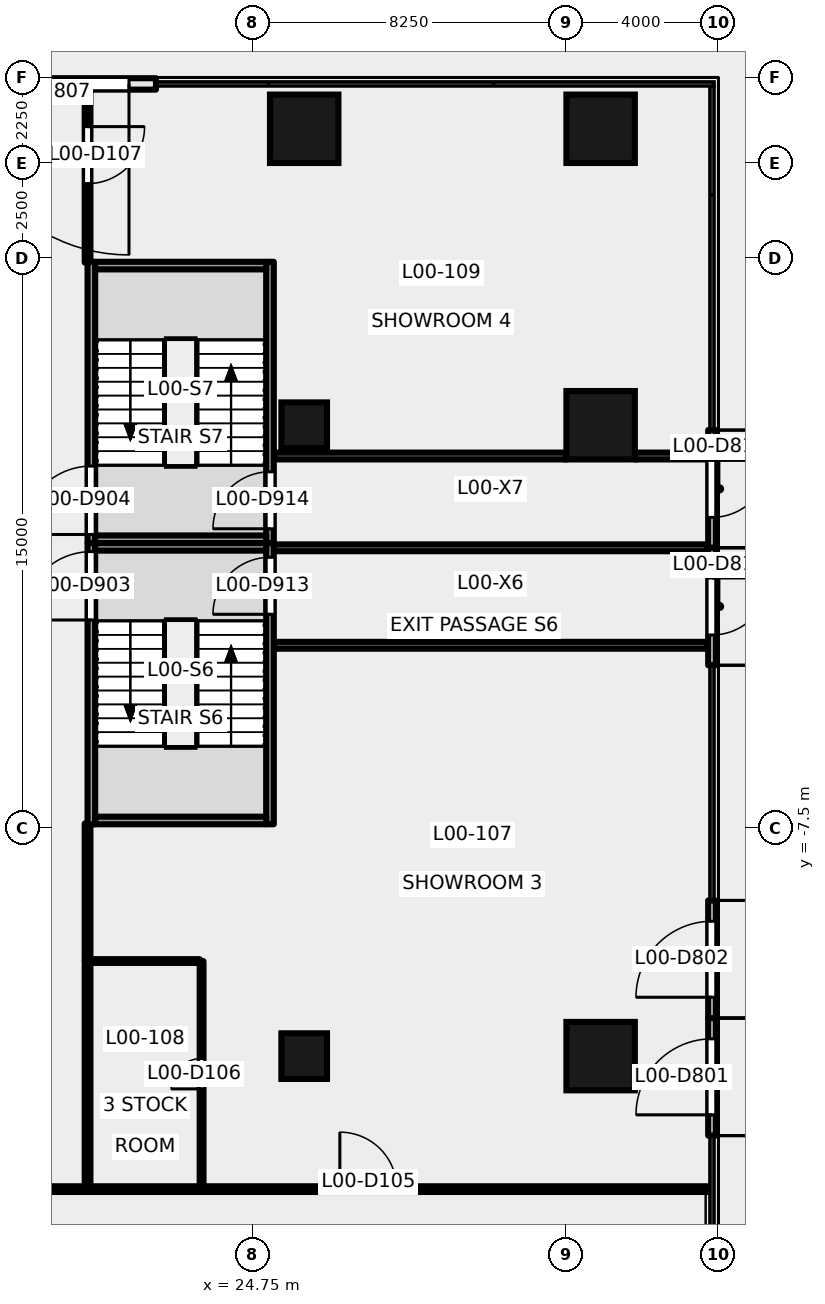
"""IFC4 building model, lengths in metres.
Left out: names, types, materials, properties, quantities, classifications, styles, units other than length and angle.
Written with IfcOpenShell. Run it as: python <this file> out.ifc"""

import sys

from ifc_helpers import new_model, si_unit, direction, frame, frame_2d, origin, origin_2d, place, context, subcontext, project, spatial, rectangle, extrude, element, fill, save


model = new_model("IFC4")
c1 = context("Model", 3, precision=1e-05, world=origin(), true_north=direction((0.0, 1.0)))
c2 = subcontext(c1, "Body", "Model", "MODEL_VIEW")
j1 = project(units=[si_unit("LENGTHUNIT", "METRE"), si_unit("PLANEANGLEUNIT", "RADIAN")], contexts=[c1])
p1 = place(None, origin())
s1 = spatial("IfcSite", under=j1, at=p1, CompositionType="ELEMENT")
p2 = place(p1, origin())
s2 = spatial("IfcBuilding", under=s1, at=p2, CompositionType="ELEMENT")
p3 = place(p2, origin())
s3 = spatial("IfcBuildingStorey", under=s2, at=p3, CompositionType="ELEMENT", Elevation=0.0)
for number, where, z_axis, x_axis in (
    (1, (33.9, 10.9, -0.2), (0.0, 0.0, 1.0), (1.0, 0.0, 0.0)),
    (2, (33.9, -13.5, -0.2), (0.0, 0.0, 1.0), (0.0, 1.0, 0.0)),
    (3, (33.9, 3.1, -0.2), (0.0, 0.0, 1.0), (0.0, 1.0, 0.0)),
    (4, (26.1, 10.9, -0.2), (0.0, 0.0, 1.0), (1.0, 0.0, 0.0)),
):
    element("IfcColumn", number, at=place(p3, frame(where, z_axis=z_axis, x_axis=x_axis)), inside=s3, PredefinedType="COLUMN", context=c2, shape_type="SweptSolid", body=[
        extrude(rectangle(XDim=1.8, YDim=1.8, at=origin_2d()), origin(), (0.0, 0.0, 1.0), 7.2),
    ])
for number, where, z_axis, x_axis in (
    (5, (26.1, -13.5, -0.2), (0.0, 0.0, 1.0), (1.0, 0.0, 0.0)),
    (6, (26.1, 3.1, -0.2), (0.0, 0.0, 1.0), (1.0, 0.0, 0.0)),
):
    element("IfcColumn", number, at=place(p3, frame(where, z_axis=z_axis, x_axis=x_axis)), inside=s3, PredefinedType="COLUMN", context=c2, shape_type="SweptSolid", body=[
        extrude(rectangle(XDim=1.2, YDim=1.2, at=origin_2d()), origin(), (0.0, 0.0, 1.0), 7.2),
    ])
p4 = place(p3, frame((36.83, -15.592, 0.0), z_axis=(0.0, 0.0, 1.0), x_axis=(0.0, 1.0, 0.0)))
e7 = element("IfcWall", 7, at=p4, inside=s3, PredefinedType="SOLIDWALL", context=c2, shape_type="SweptSolid", body=[
    extrude(rectangle(XDim=3.094, YDim=0.2, at=frame_2d((1.547, 0.0))), origin(), (0.0, 0.0, 1.0), 7.0),
])
p5 = place(p4, frame((0.547, 0.0, 0.0)))
e8 = element("IfcOpeningElement", 8, at=p5, cuts=e7, PredefinedType="OPENING", context=c2, shape_type="SweptSolid", body=[
    extrude(rectangle(XDim=2.0, YDim=2.4, at=frame_2d((1.0, 1.2))), frame((0.0, 0.111, 0.0), z_axis=(0.0, -1.0, 0.0), x_axis=(1.0, 0.0, 0.0)), (0.0, 0.0, 1.0), 0.221),
])
p6 = place(p3, frame((36.83, -12.498, 0.0), z_axis=(0.0, 0.0, 1.0), x_axis=(0.0, 1.0, 0.0)))
e9 = element("IfcWall", 9, at=p6, inside=s3, PredefinedType="SOLIDWALL", context=c2, shape_type="SweptSolid", body=[
    extrude(rectangle(XDim=3.094, YDim=0.2, at=frame_2d((1.547, 0.0))), origin(), (0.0, 0.0, 1.0), 7.0),
])
p7 = place(p6, frame((0.547, 0.0, 0.0)))
e10 = element("IfcOpeningElement", 10, at=p7, cuts=e9, PredefinedType="OPENING", context=c2, shape_type="SweptSolid", body=[
    extrude(rectangle(XDim=2.0, YDim=2.4, at=frame_2d((1.0, 1.2))), frame((0.0, 0.111, 0.0), z_axis=(0.0, -1.0, 0.0), x_axis=(1.0, 0.0, 0.0)), (0.0, 0.0, 1.0), 0.221),
])
p8 = place(p3, frame((36.83, -0.122, 0.0), z_axis=(0.0, 0.0, 1.0), x_axis=(0.0, -1.0, 0.0)))
e11 = element("IfcWall", 11, at=p8, inside=s3, PredefinedType="SOLIDWALL", context=c2, shape_type="SweptSolid", body=[
    extrude(rectangle(XDim=3.094, YDim=0.2, at=frame_2d((1.547, 0.0))), origin(), (0.0, 0.0, 1.0), 7.0),
])
p9 = place(p8, frame((0.797, 0.0, 0.0)))
e12 = element("IfcOpeningElement", 12, at=p9, cuts=e11, PredefinedType="OPENING", context=c2, shape_type="SweptSolid", body=[
    extrude(rectangle(XDim=1.5, YDim=2.4, at=frame_2d((0.75, 1.2))), frame((0.0, 0.111, 0.0), z_axis=(0.0, -1.0, 0.0), x_axis=(1.0, 0.0, 0.0)), (0.0, 0.0, 1.0), 0.221),
])
p10 = place(p3, frame((36.83, 2.972, 0.0), z_axis=(0.0, 0.0, 1.0), x_axis=(0.0, -1.0, 0.0)))
e13 = element("IfcWall", 13, at=p10, inside=s3, PredefinedType="SOLIDWALL", context=c2, shape_type="SweptSolid", body=[
    extrude(rectangle(XDim=3.094, YDim=0.2, at=frame_2d((1.547, 0.0))), origin(), (0.0, 0.0, 1.0), 7.0),
])
p11 = place(p10, frame((0.797, 0.0, 0.0)))
e14 = element("IfcOpeningElement", 14, at=p11, cuts=e13, PredefinedType="OPENING", context=c2, shape_type="SweptSolid", body=[
    extrude(rectangle(XDim=1.5, YDim=2.4, at=frame_2d((0.75, 1.2))), frame((0.0, 0.111, 0.0), z_axis=(0.0, -1.0, 0.0), x_axis=(1.0, 0.0, 0.0)), (0.0, 0.0, 1.0), 0.221),
])
p12 = place(p3, frame((22.2, 12.08, 0.0), z_axis=(0.0, 0.0, 1.0), x_axis=(-1.0, 0.0, 0.0)))
e15 = element("IfcWall", 15, at=p12, inside=s3, PredefinedType="SOLIDWALL", context=c2, shape_type="SweptSolid", body=[
    extrude(rectangle(XDim=5.92, YDim=0.3, at=frame_2d((2.96, 0.0))), origin(), (0.0, 0.0, 1.0), 7.0),
])
p13 = place(p12, frame((0.71, 0.0, 0.0)))
e16 = element("IfcOpeningElement", 16, at=p13, cuts=e15, PredefinedType="OPENING", context=c2, shape_type="SweptSolid", body=[
    extrude(rectangle(XDim=4.5, YDim=4.2, at=frame_2d((2.25, 2.1))), frame((0.0, 0.161, 0.0), z_axis=(0.0, -1.0, 0.0), x_axis=(1.0, 0.0, 0.0)), (0.0, 0.0, 1.0), 0.321),
])
p14 = place(p3, frame((20.5, -7.4, -0.2), z_axis=(0.0, 0.0, 1.0), x_axis=(0.0, 1.0, 0.0)))
e17 = element("IfcWall", 17, at=p14, inside=s3, PredefinedType="SHEAR", context=c2, shape_type="SweptSolid", body=[
    extrude(rectangle(XDim=7.4, YDim=0.2, at=frame_2d((3.7, 0.0))), origin(), (0.0, 0.0, 1.0), 7.2),
])
p15 = place(p14, frame((5.375, 0.0, 0.2)))
e18 = element("IfcOpeningElement", 18, at=p15, cuts=e17, PredefinedType="OPENING", context=c2, shape_type="SweptSolid", body=[
    extrude(rectangle(XDim=1.8, YDim=2.1, at=frame_2d((0.9, 1.05))), frame((0.0, 0.111, 0.0), z_axis=(0.0, -1.0, 0.0), x_axis=(1.0, 0.0, 0.0)), (0.0, 0.0, 1.0), 0.221),
])
p16 = place(p3, frame((25.2, -7.4, -0.2), z_axis=(0.0, 0.0, 1.0), x_axis=(0.0, 1.0, 0.0)))
e19 = element("IfcWall", 19, at=p16, inside=s3, PredefinedType="SHEAR", context=c2, shape_type="SweptSolid", body=[
    extrude(rectangle(XDim=7.4, YDim=0.2, at=frame_2d((3.7, 0.0))), origin(), (0.0, 0.0, 1.0), 7.2),
])
p17 = place(p16, frame((5.525, 0.0, 0.2)))
e20 = element("IfcOpeningElement", 20, at=p17, cuts=e19, PredefinedType="OPENING", context=c2, shape_type="SweptSolid", body=[
    extrude(rectangle(XDim=1.5, YDim=2.1, at=frame_2d((0.75, 1.05))), frame((0.0, 0.111, 0.0), z_axis=(0.0, -1.0, 0.0), x_axis=(1.0, 0.0, 0.0)), (0.0, 0.0, 1.0), 0.221),
])
for number, where, z_axis, x_axis in (
    (21, (20.6, -0.1, -0.2), (0.0, 0.0, 1.0), (1.0, 0.0, 0.0)),
    (22, (20.6, -7.3, -0.2), (0.0, 0.0, 1.0), (1.0, 0.0, 0.0)),
):
    element("IfcWall", number, at=place(p3, frame(where, z_axis=z_axis, x_axis=x_axis)), inside=s3, PredefinedType="SHEAR", context=c2, shape_type="SweptSolid", body=[
        extrude(rectangle(XDim=4.5, YDim=0.2, at=frame_2d((2.25, 0.0))), origin(), (0.0, 0.0, 1.0), 7.2),
    ])
p18 = place(p3, frame((20.5, 0.0, -0.2), z_axis=(0.0, 0.0, 1.0), x_axis=(0.0, 1.0, 0.0)))
e23 = element("IfcWall", 23, at=p18, inside=s3, PredefinedType="SHEAR", context=c2, shape_type="SweptSolid", body=[
    extrude(rectangle(XDim=7.4, YDim=0.2, at=frame_2d((3.7, 0.0))), origin(), (0.0, 0.0, 1.0), 7.2),
])
p19 = place(p18, frame((0.225, 0.0, 0.2)))
e24 = element("IfcOpeningElement", 24, at=p19, cuts=e23, PredefinedType="OPENING", context=c2, shape_type="SweptSolid", body=[
    extrude(rectangle(XDim=1.8, YDim=2.1, at=frame_2d((0.9, 1.05))), frame((0.0, 0.111, 0.0), z_axis=(0.0, -1.0, 0.0), x_axis=(1.0, 0.0, 0.0)), (0.0, 0.0, 1.0), 0.221),
])
p20 = place(p3, frame((25.2, 0.0, -0.2), z_axis=(0.0, 0.0, 1.0), x_axis=(0.0, 1.0, 0.0)))
e25 = element("IfcWall", 25, at=p20, inside=s3, PredefinedType="SHEAR", context=c2, shape_type="SweptSolid", body=[
    extrude(rectangle(XDim=7.4, YDim=0.2, at=frame_2d((3.7, 0.0))), origin(), (0.0, 0.0, 1.0), 7.2),
])
p21 = place(p20, frame((0.375, 0.0, 0.2)))
e26 = element("IfcOpeningElement", 26, at=p21, cuts=e25, PredefinedType="OPENING", context=c2, shape_type="SweptSolid", body=[
    extrude(rectangle(XDim=1.5, YDim=2.1, at=frame_2d((0.75, 1.05))), frame((0.0, 0.111, 0.0), z_axis=(0.0, -1.0, 0.0), x_axis=(1.0, 0.0, 0.0)), (0.0, 0.0, 1.0), 0.221),
])
for number, where, z_axis, x_axis in (
    (27, (20.6, 7.3, -0.2), (0.0, 0.0, 1.0), (1.0, 0.0, 0.0)),
    (28, (20.6, 0.1, -0.2), (0.0, 0.0, 1.0), (1.0, 0.0, 0.0)),
):
    element("IfcWall", number, at=place(p3, frame(where, z_axis=z_axis, x_axis=x_axis)), inside=s3, PredefinedType="SHEAR", context=c2, shape_type="SweptSolid", body=[
        extrude(rectangle(XDim=4.5, YDim=0.2, at=frame_2d((2.25, 0.0))), origin(), (0.0, 0.0, 1.0), 7.2),
    ])
for number, where, z_axis, x_axis in (
    (29, (25.3, -2.69, 0.0), (0.0, 0.0, 1.0), (1.0, 0.0, 0.0)),
    (30, (25.3, -0.125, 0.0), (0.0, 0.0, 1.0), (1.0, 0.0, 0.0)),
):
    element("IfcWall", number, at=place(p3, frame(where, z_axis=z_axis, x_axis=x_axis)), inside=s3, PredefinedType="PARTITIONING", context=c2, shape_type="SweptSolid", body=[
        extrude(rectangle(XDim=11.4, YDim=0.18, at=frame_2d((5.7, 0.0))), origin(), (0.0, 0.0, 1.0), 7.0),
    ])
p22 = place(p3, frame((25.3, 2.29, 0.0), z_axis=(0.0, 0.0, 1.0), x_axis=(1.0, 0.0, 0.0)))
e31 = element("IfcWall", 31, at=p22, inside=s3, PredefinedType="PARTITIONING", context=c2, shape_type="SweptSolid", body=[
    extrude(rectangle(XDim=7.7, YDim=0.18, at=frame_2d((3.85, 0.0))), origin(), (0.0, 0.0, 1.0), 7.0),
])
p23 = place(p3, frame((34.8, 2.29, 0.0), z_axis=(0.0, 0.0, 1.0), x_axis=(1.0, 0.0, 0.0)))
e32 = element("IfcWall", 32, at=p23, inside=s3, PredefinedType="PARTITIONING", context=c2, shape_type="SweptSolid", body=[
    extrude(rectangle(XDim=1.9, YDim=0.18, at=frame_2d((0.95, 0.0))), origin(), (0.0, 0.0, 1.0), 7.0),
])
p24 = place(p3, frame((-15.4, -17.0, 0.0), z_axis=(0.0, 0.0, 1.0), x_axis=(1.0, 0.0, 0.0)))
e33 = element("IfcWall", 33, at=p24, inside=s3, PredefinedType="PARTITIONING", context=c2, shape_type="SweptSolid", body=[
    extrude(rectangle(XDim=35.8, YDim=0.15, at=frame_2d((17.9, 0.0))), origin(), (0.0, 0.0, 1.0), 6.0),
])
p25 = place(p24, frame((17.0, 0.0, 0.0)))
e34 = element("IfcOpeningElement", 34, at=p25, cuts=e33, PredefinedType="OPENING", context=c2, shape_type="SweptSolid", body=[
    extrude(rectangle(XDim=1.8, YDim=2.1, at=frame_2d((0.9, 1.05))), frame((0.0, 0.085, 0.0), z_axis=(0.0, -1.0, 0.0), x_axis=(1.0, 0.0, 0.0)), (0.0, 0.0, 1.0), 0.171),
])
p26 = place(p24, frame((27.05, 0.0, 0.0)))
e35 = element("IfcOpeningElement", 35, at=p26, cuts=e33, PredefinedType="OPENING", context=c2, shape_type="SweptSolid", body=[
    extrude(rectangle(XDim=1.8, YDim=2.1, at=frame_2d((0.9, 1.05))), frame((0.0, 0.085, 0.0), z_axis=(0.0, -1.0, 0.0), x_axis=(1.0, 0.0, 0.0)), (0.0, 0.0, 1.0), 0.171),
])
p27 = place(p3, frame((20.4, -7.38, 0.0), z_axis=(0.0, 0.0, 1.0), x_axis=(0.0, -1.0, 0.0)))
e36 = element("IfcWall", 36, at=p27, inside=s3, PredefinedType="PARTITIONING", context=c2, shape_type="SweptSolid", body=[
    extrude(rectangle(XDim=3.599, YDim=0.15, at=frame_2d((1.8, 0.0))), origin(), (0.0, 0.0, 1.0), 7.0),
])
p28 = place(p3, frame((20.4, -10.979, 0.0), z_axis=(0.0, 0.0, 1.0), x_axis=(0.0, -1.0, 0.0)))
e37 = element("IfcWall", 37, at=p28, inside=s3, PredefinedType="PARTITIONING", context=c2, shape_type="SweptSolid", body=[
    extrude(rectangle(XDim=5.946, YDim=0.15, at=frame_2d((2.973, 0.0))), origin(), (0.0, 0.0, 1.0), 6.0),
])
p29 = place(p3, frame((20.4, 11.99, 0.0), z_axis=(0.0, 0.0, 1.0), x_axis=(0.0, -1.0, 0.0)))
e38 = element("IfcWall", 38, at=p29, inside=s3, PredefinedType="PARTITIONING", context=c2, shape_type="SweptSolid", body=[
    extrude(rectangle(XDim=4.61, YDim=0.15, at=frame_2d((2.305, 0.0))), origin(), (0.0, 0.0, 1.0), 6.0),
])
p30 = place(p29, frame((1.033, 0.0, 0.0)))
e39 = element("IfcOpeningElement", 39, at=p30, cuts=e38, PredefinedType="OPENING", context=c2, shape_type="SweptSolid", body=[
    extrude(rectangle(XDim=1.5, YDim=2.1, at=frame_2d((0.75, 1.05))), frame((0.0, 0.085, 0.0), z_axis=(0.0, -1.0, 0.0), x_axis=(1.0, 0.0, 0.0)), (0.0, 0.0, 1.0), 0.171),
])
p31 = place(p3, frame((23.38, -17.0, 0.0), z_axis=(0.0, 0.0, 1.0), x_axis=(1.0, 0.0, 0.0)))
e40 = element("IfcWall", 40, at=p31, inside=s3, PredefinedType="PARTITIONING", context=c2, shape_type="SweptSolid", body=[
    extrude(rectangle(XDim=13.36, YDim=0.15, at=frame_2d((6.68, 0.0))), origin(), (0.0, 0.0, 1.0), 6.0),
])
p32 = place(p31, frame((3.658, 0.0, 0.0)))
e41 = element("IfcOpeningElement", 41, at=p32, cuts=e40, PredefinedType="OPENING", context=c2, shape_type="SweptSolid", body=[
    extrude(rectangle(XDim=1.5, YDim=2.1, at=frame_2d((0.75, 1.05))), frame((0.0, 0.085, 0.0), z_axis=(0.0, -1.0, 0.0), x_axis=(1.0, 0.0, 0.0)), (0.0, 0.0, 1.0), 0.171),
])
p33 = place(p3, frame((20.4, -17.0, 0.0), z_axis=(0.0, 0.0, 1.0), x_axis=(1.0, 0.0, 0.0)))
e42 = element("IfcWall", 42, at=p33, inside=s3, PredefinedType="PARTITIONING", context=c2, shape_type="SweptSolid", body=[
    extrude(rectangle(XDim=2.98, YDim=0.15, at=frame_2d((1.49, 0.0))), origin(), (0.0, 0.0, 1.0), 6.39),
])
p34 = place(p3, frame((23.35, -10.999, 0.0), z_axis=(0.0, 0.0, 1.0), x_axis=(-1.0, 0.0, 0.0)))
e43 = element("IfcWall", 43, at=p34, inside=s3, PredefinedType="PARTITIONING", context=c2, shape_type="SweptSolid", body=[
    extrude(rectangle(XDim=2.875, YDim=0.1, at=frame_2d((1.438, 0.0))), origin(), (0.0, 0.0, 1.0), 6.7),
])
p35 = place(p3, frame((23.4, -16.925, 0.0), z_axis=(0.0, 0.0, 1.0), x_axis=(0.0, 1.0, 0.0)))
e44 = element("IfcWall", 44, at=p35, inside=s3, PredefinedType="PARTITIONING", context=c2, shape_type="SweptSolid", body=[
    extrude(rectangle(XDim=5.926, YDim=0.1, at=frame_2d((2.963, 0.0))), origin(), (0.0, 0.0, 1.0), 6.0),
])
p36 = place(p35, frame((2.563, 0.0, 0.0)))
e45 = element("IfcOpeningElement", 45, at=p36, cuts=e44, PredefinedType="OPENING", context=c2, shape_type="SweptSolid", body=[
    extrude(rectangle(XDim=0.8, YDim=2.1, at=frame_2d((0.4, 1.05))), frame((0.0, 0.061, 0.0), z_axis=(0.0, -1.0, 0.0), x_axis=(1.0, 0.0, 0.0)), (0.0, 0.0, 1.0), 0.121),
])
p37 = place(p5, origin())
e46 = element("IfcDoor", 46, at=p37, inside=s3, OperationType="DOUBLE_DOOR_SINGLE_SWING", PredefinedType="DOOR", context=c2, shape_type="SweptSolid", body=[
    extrude(rectangle(XDim=2.0, YDim=2.4, at=frame_2d((1.0, 1.2))), frame((0.0, 0.025, 0.0), z_axis=(0.0, -1.0, 0.0), x_axis=(1.0, 0.0, 0.0)), (0.0, 0.0, 1.0), 0.05),
])
fill(e8, e46)
p38 = place(p7, origin())
e47 = element("IfcDoor", 47, at=p38, inside=s3, OperationType="DOUBLE_DOOR_SINGLE_SWING", PredefinedType="DOOR", context=c2, shape_type="SweptSolid", body=[
    extrude(rectangle(XDim=2.0, YDim=2.4, at=frame_2d((1.0, 1.2))), frame((0.0, 0.025, 0.0), z_axis=(0.0, -1.0, 0.0), x_axis=(1.0, 0.0, 0.0)), (0.0, 0.0, 1.0), 0.05),
])
fill(e10, e47)
p39 = place(p9, origin())
e48 = element("IfcDoor", 48, at=p39, inside=s3, OperationType="DOUBLE_DOOR_SINGLE_SWING", PredefinedType="DOOR", context=c2, shape_type="SweptSolid", body=[
    extrude(rectangle(XDim=1.5, YDim=2.4, at=frame_2d((0.75, 1.2))), frame((0.0, 0.025, 0.0), z_axis=(0.0, -1.0, 0.0), x_axis=(1.0, 0.0, 0.0)), (0.0, 0.0, 1.0), 0.05),
])
fill(e12, e48)
p40 = place(p11, origin())
e49 = element("IfcDoor", 49, at=p40, inside=s3, OperationType="DOUBLE_DOOR_SINGLE_SWING", PredefinedType="DOOR", context=c2, shape_type="SweptSolid", body=[
    extrude(rectangle(XDim=1.5, YDim=2.4, at=frame_2d((0.75, 1.2))), frame((0.0, 0.025, 0.0), z_axis=(0.0, -1.0, 0.0), x_axis=(1.0, 0.0, 0.0)), (0.0, 0.0, 1.0), 0.05),
])
fill(e14, e49)
p41 = place(p13, origin())
e50 = element("IfcDoor", 50, at=p41, inside=s3, OperationType="USERDEFINED", PredefinedType="DOOR", context=c2, shape_type="SweptSolid", body=[
    extrude(rectangle(XDim=4.5, YDim=4.2, at=frame_2d((2.25, 2.1))), frame((0.0, 0.025, 0.0), z_axis=(0.0, -1.0, 0.0), x_axis=(1.0, 0.0, 0.0)), (0.0, 0.0, 1.0), 0.05),
])
fill(e16, e50)
p42 = place(p15, origin())
e51 = element("IfcDoor", 51, at=p42, inside=s3, OperationType="DOUBLE_DOOR_SINGLE_SWING", PredefinedType="DOOR", context=c2, shape_type="SweptSolid", body=[
    extrude(rectangle(XDim=1.8, YDim=2.1, at=frame_2d((0.9, 1.05))), frame((0.0, 0.025, 0.0), z_axis=(0.0, -1.0, 0.0), x_axis=(1.0, 0.0, 0.0)), (0.0, 0.0, 1.0), 0.05),
])
fill(e18, e51)
p43 = place(p17, origin())
e52 = element("IfcDoor", 52, at=p43, inside=s3, OperationType="DOUBLE_DOOR_SINGLE_SWING", PredefinedType="DOOR", context=c2, shape_type="SweptSolid", body=[
    extrude(rectangle(XDim=1.5, YDim=2.1, at=frame_2d((0.75, 1.05))), frame((0.0, 0.025, 0.0), z_axis=(0.0, -1.0, 0.0), x_axis=(1.0, 0.0, 0.0)), (0.0, 0.0, 1.0), 0.05),
])
fill(e20, e52)
p44 = place(p19, origin())
e53 = element("IfcDoor", 53, at=p44, inside=s3, OperationType="DOUBLE_DOOR_SINGLE_SWING", PredefinedType="DOOR", context=c2, shape_type="SweptSolid", body=[
    extrude(rectangle(XDim=1.8, YDim=2.1, at=frame_2d((0.9, 1.05))), frame((0.0, 0.025, 0.0), z_axis=(0.0, -1.0, 0.0), x_axis=(1.0, 0.0, 0.0)), (0.0, 0.0, 1.0), 0.05),
])
fill(e24, e53)
p45 = place(p21, origin())
e54 = element("IfcDoor", 54, at=p45, inside=s3, OperationType="DOUBLE_DOOR_SINGLE_SWING", PredefinedType="DOOR", context=c2, shape_type="SweptSolid", body=[
    extrude(rectangle(XDim=1.5, YDim=2.1, at=frame_2d((0.75, 1.05))), frame((0.0, 0.025, 0.0), z_axis=(0.0, -1.0, 0.0), x_axis=(1.0, 0.0, 0.0)), (0.0, 0.0, 1.0), 0.05),
])
fill(e26, e54)
p46 = place(p32, origin())
e55 = element("IfcDoor", 55, at=p46, inside=s3, OperationType="DOUBLE_DOOR_SINGLE_SWING", PredefinedType="DOOR", context=c2, shape_type="SweptSolid", body=[
    extrude(rectangle(XDim=1.5, YDim=2.1, at=frame_2d((0.75, 1.05))), frame((0.0, 0.025, 0.0), z_axis=(0.0, -1.0, 0.0), x_axis=(1.0, 0.0, 0.0)), (0.0, 0.0, 1.0), 0.05),
])
fill(e41, e55)
p47 = place(p36, origin())
e56 = element("IfcDoor", 56, at=p47, inside=s3, OperationType="SINGLE_SWING_LEFT", PredefinedType="DOOR", context=c2, shape_type="SweptSolid", body=[
    extrude(rectangle(XDim=0.8, YDim=2.1, at=frame_2d((0.4, 1.05))), frame((0.0, 0.025, 0.0), z_axis=(0.0, -1.0, 0.0), x_axis=(1.0, 0.0, 0.0)), (0.0, 0.0, 1.0), 0.05),
])
fill(e45, e56)
p48 = place(p30, origin())
e57 = element("IfcDoor", 57, at=p48, inside=s3, OperationType="DOUBLE_DOOR_SINGLE_SWING", PredefinedType="DOOR", context=c2, shape_type="SweptSolid", body=[
    extrude(rectangle(XDim=1.5, YDim=2.1, at=frame_2d((0.75, 1.05))), frame((0.0, 0.025, 0.0), z_axis=(0.0, -1.0, 0.0), x_axis=(1.0, 0.0, 0.0)), (0.0, 0.0, 1.0), 0.05),
])
fill(e39, e57)
save(model, sys.argv[1])
